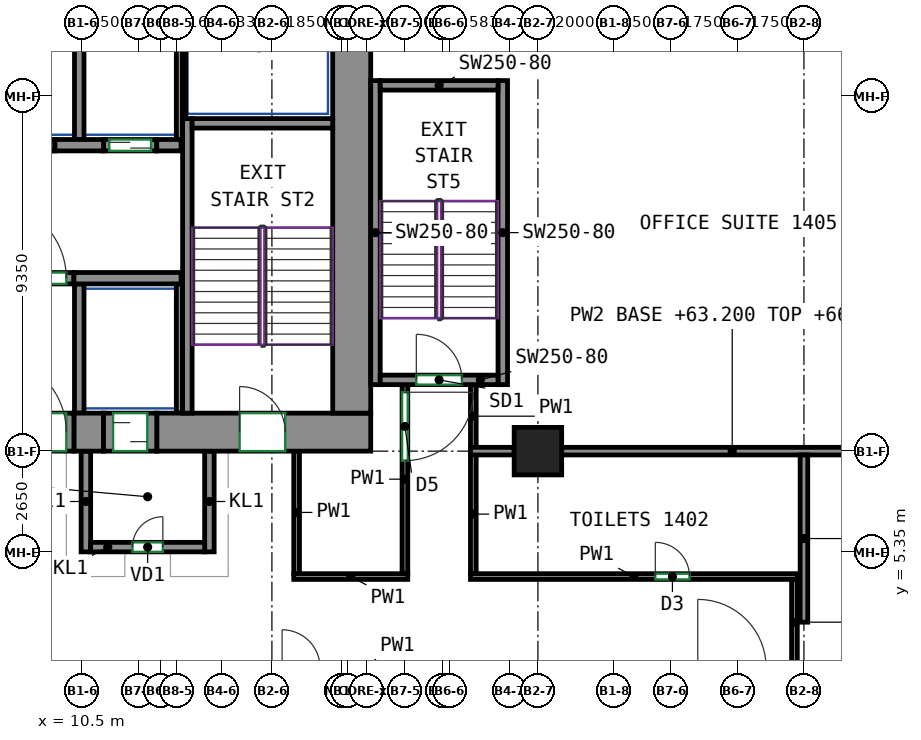
"""IFC4 building model, lengths in metres.
Left out: names, types, materials, properties, quantities, classifications, styles, units other than length and angle.
Written with IfcOpenShell. Run it as: python <this file> out.ifc"""

import sys

from ifc_helpers import new_model, si_unit, direction, frame, frame_2d, origin, origin_2d, place, context, subcontext, project, spatial, rectangle, extrude, source, transform, mapped, element, fill, save


model = new_model("IFC4")
c1 = context("Model", 3, precision=1e-05, world=origin(), true_north=direction((0.0, 1.0)))
c2 = subcontext(c1, "Body", "Model", "MODEL_VIEW")
j1 = project(units=[si_unit("LENGTHUNIT", "METRE"), si_unit("PLANEANGLEUNIT", "RADIAN")], contexts=[c1])
p1 = place(None, origin())
s1 = spatial("IfcSite", under=j1, at=p1, CompositionType="ELEMENT")
p2 = place(p1, origin())
s2 = spatial("IfcBuilding", under=s1, at=p2, CompositionType="ELEMENT")
p3 = place(p2, frame((0.0, 0.0, 63.2)))
s3 = spatial("IfcBuildingStorey", under=s2, at=p3, CompositionType="ELEMENT", Elevation=63.2)
m1 = source(origin(), c2, "Body", "SweptSolid", [
    extrude(rectangle(XDim=1.25, YDim=1.25, at=origin_2d()), origin(), (0.0, 0.0, 1.0), 3.72),
])
p4 = place(p3, frame((22.5, 8.0, 0.0), z_axis=(0.0, 0.0, 1.0), x_axis=(1.0, 0.0, 0.0)))
e1 = element("IfcColumn", 1, at=p4, inside=s3, PredefinedType="COLUMN", context=c2, shape_type="MappedRepresentation", body=[
    mapped(m1, transform((0.0, 0.0, 0.0))),
])
m2 = source(origin(), c2, "Body", "SweptSolid", [
    extrude(rectangle(XDim=0.78, YDim=1.0, at=frame_2d((0.39, 0.0))), origin(), (0.0, 0.0, 1.0), 3.72),
])
p5 = place(p3, frame((10.29, 8.5, 0.0), z_axis=(0.0, 0.0, 1.0), x_axis=(1.0, 0.0, 0.0)))
e2 = element("IfcWall", 2, at=p5, inside=s3, PredefinedType="SHEAR", context=c2, shape_type="MappedRepresentation", body=[
    mapped(m2, transform((0.0, 0.0, 0.0))),
])
m3 = source(origin(), c2, "Body", "SweptSolid", [
    extrude(rectangle(XDim=5.63, YDim=1.0, at=frame_2d((2.815, 0.0))), origin(), (0.0, 0.0, 1.0), 3.72),
])
p6 = place(p3, frame((12.47, 8.5, 0.0), z_axis=(0.0, 0.0, 1.0), x_axis=(1.0, 0.0, 0.0)))
e3 = element("IfcWall", 3, at=p6, inside=s3, PredefinedType="SHEAR", context=c2, shape_type="MappedRepresentation", body=[
    mapped(m3, transform((0.0, 0.0, 0.0))),
])
p7 = place(p6, frame((2.18, 0.0, 0.0)))
e4 = element("IfcOpeningElement", 4, at=p7, cuts=e3, PredefinedType="OPENING", context=c2, shape_type="SweptSolid", body=[
    extrude(rectangle(XDim=1.2, YDim=2.1, at=frame_2d((0.6, 1.05))), frame((0.0, 0.51, 0.0), z_axis=(0.0, -1.0, 0.0), x_axis=(1.0, 0.0, 0.0)), (0.0, 0.0, 1.0), 1.02),
])
m4 = source(origin(), c2, "Body", "SweptSolid", [
    extrude(rectangle(XDim=12.0, YDim=1.0, at=frame_2d((6.0, 0.0))), origin(), (0.0, 0.0, 1.0), 3.72),
])
p8 = place(p3, frame((17.6, 9.0, 0.0), z_axis=(0.0, 0.0, 1.0), x_axis=(0.0, 1.0, 0.0)))
e5 = element("IfcWall", 5, at=p8, inside=s3, PredefinedType="SHEAR", context=c2, shape_type="MappedRepresentation", body=[
    mapped(m4, transform((0.0, 0.0, 0.0))),
])
m5 = source(origin(), c2, "Body", "SweptSolid", [
    extrude(rectangle(XDim=7.75, YDim=0.25, at=frame_2d((3.875, 0.0))), origin(), (0.0, 0.0, 1.0), 3.72),
])
p9 = place(p3, frame((13.275, 9.0, 0.0), z_axis=(0.0, 0.0, 1.0), x_axis=(0.0, 1.0, 0.0)))
e6 = element("IfcWall", 6, at=p9, inside=s3, PredefinedType="SHEAR", context=c2, shape_type="MappedRepresentation", body=[
    mapped(m5, transform((0.0, 0.0, 0.0))),
])
m6 = source(origin(), c2, "Body", "SweptSolid", [
    extrude(rectangle(XDim=3.7, YDim=0.25, at=frame_2d((1.85, 0.0))), origin(), (0.0, 0.0, 1.0), 3.72),
])
p10 = place(p3, frame((13.4, 16.625, 0.0), z_axis=(0.0, 0.0, 1.0), x_axis=(1.0, 0.0, 0.0)))
e7 = element("IfcWall", 7, at=p10, inside=s3, PredefinedType="SHEAR", context=c2, shape_type="MappedRepresentation", body=[
    mapped(m6, transform((0.0, 0.0, 0.0))),
])
m7 = source(origin(), c2, "Body", "SweptSolid", [
    extrude(rectangle(XDim=8.0, YDim=0.25, at=frame_2d((4.0, 0.0))), origin(), (0.0, 0.0, 1.0), 3.72),
])
for number, where, z_axis, x_axis in (
    (8, (18.225, 9.75, 0.0), (0.0, 0.0, 1.0), (0.0, 1.0, 0.0)),
    (9, (21.575, 9.75, 0.0), (0.0, 0.0, 1.0), (0.0, 1.0, 0.0)),
):
    element("IfcWall", number, at=place(p3, frame(where, z_axis=z_axis, x_axis=x_axis)), inside=s3, PredefinedType="SHEAR", context=c2, shape_type="MappedRepresentation", body=[
        mapped(m7, transform((0.0, 0.0, 0.0))),
    ])
m8 = source(origin(), c2, "Body", "SweptSolid", [
    extrude(rectangle(XDim=3.1, YDim=0.25, at=frame_2d((1.55, 0.0))), origin(), (0.0, 0.0, 1.0), 3.72),
])
p11 = place(p3, frame((18.35, 9.875, 0.0), z_axis=(0.0, 0.0, 1.0), x_axis=(1.0, 0.0, 0.0)))
e10 = element("IfcWall", 10, at=p11, inside=s3, PredefinedType="SHEAR", context=c2, shape_type="MappedRepresentation", body=[
    mapped(m8, transform((0.0, 0.0, 0.0))),
])
p12 = place(p11, frame((0.95, 0.0, 0.0)))
e11 = element("IfcOpeningElement", 11, at=p12, cuts=e10, PredefinedType="OPENING", context=c2, shape_type="SweptSolid", body=[
    extrude(rectangle(XDim=1.2, YDim=2.1, at=frame_2d((0.6, 1.05))), frame((0.0, 0.135, 0.0), z_axis=(0.0, -1.0, 0.0), x_axis=(1.0, 0.0, 0.0)), (0.0, 0.0, 1.0), 0.27),
])
p13 = place(p3, frame((18.35, 17.625, 0.0), z_axis=(0.0, 0.0, 1.0), x_axis=(1.0, 0.0, 0.0)))
e12 = element("IfcWall", 12, at=p13, inside=s3, PredefinedType="SHEAR", context=c2, shape_type="MappedRepresentation", body=[
    mapped(m8, transform((0.0, 0.0, 0.0))),
])
m9 = source(origin(), c2, "Body", "SweptSolid", [
    extrude(rectangle(XDim=2.82, YDim=0.3, at=frame_2d((1.41, 0.0))), origin(), (0.0, 0.0, 1.0), 3.72),
])
p14 = place(p3, frame((10.29, 12.55, 0.0), z_axis=(0.0, 0.0, 1.0), x_axis=(1.0, 0.0, 0.0)))
e13 = element("IfcWall", 13, at=p14, inside=s3, PredefinedType="SHEAR", context=c2, shape_type="MappedRepresentation", body=[
    mapped(m9, transform((0.0, 0.0, 0.0))),
])
m10 = source(origin(), c2, "Body", "SweptSolid", [
    extrude(rectangle(XDim=1.28, YDim=0.3, at=frame_2d((0.64, 0.0))), origin(), (0.0, 0.0, 1.0), 3.72),
])
p15 = place(p3, frame((9.79, 16.05, 0.0), z_axis=(0.0, 0.0, 1.0), x_axis=(1.0, 0.0, 0.0)))
e14 = element("IfcWall", 14, at=p15, inside=s3, PredefinedType="SHEAR", context=c2, shape_type="MappedRepresentation", body=[
    mapped(m10, transform((0.0, 0.0, 0.0))),
])
m11 = source(origin(), c2, "Body", "SweptSolid", [
    extrude(rectangle(XDim=0.64, YDim=0.3, at=frame_2d((0.32, 0.0))), origin(), (0.0, 0.0, 1.0), 3.72),
])
p16 = place(p3, frame((12.47, 16.05, 0.0), z_axis=(0.0, 0.0, 1.0), x_axis=(1.0, 0.0, 0.0)))
e15 = element("IfcWall", 15, at=p16, inside=s3, PredefinedType="SHEAR", context=c2, shape_type="MappedRepresentation", body=[
    mapped(m11, transform((0.0, 0.0, 0.0))),
])
m12 = source(origin(), c2, "Body", "SweptSolid", [
    extrude(rectangle(XDim=1.4, YDim=0.3, at=frame_2d((0.7, 0.0))), origin(), (0.0, 0.0, 1.0), 3.72),
])
p17 = place(p3, frame((11.07, 16.05, 0.0), z_axis=(0.0, 0.0, 1.0), x_axis=(1.0, 0.0, 0.0)))
e16 = element("IfcWall", 16, at=p17, inside=s3, PredefinedType="PARTITIONING", context=c2, shape_type="MappedRepresentation", body=[
    mapped(m12, transform((0.0, 0.0, 0.0))),
])
p18 = place(p17, frame((0.15, 0.0, 0.0)))
e17 = element("IfcOpeningElement", 17, at=p18, cuts=e16, PredefinedType="OPENING", context=c2, shape_type="SweptSolid", body=[
    extrude(rectangle(XDim=1.1, YDim=2.1, at=frame_2d((0.55, 1.05))), frame((0.0, 0.16, 0.0), z_axis=(0.0, -1.0, 0.0), x_axis=(1.0, 0.0, 0.0)), (0.0, 0.0, 1.0), 0.32),
])
m13 = source(origin(), c2, "Body", "SweptSolid", [
    extrude(rectangle(XDim=2.4, YDim=0.3, at=frame_2d((1.2, 0.0))), origin(), (0.0, 0.0, 1.0), 3.72),
])
p19 = place(p3, frame((7.89, 12.55, 0.0), z_axis=(0.0, 0.0, 1.0), x_axis=(1.0, 0.0, 0.0)))
e18 = element("IfcWall", 18, at=p19, inside=s3, PredefinedType="PARTITIONING", context=c2, shape_type="MappedRepresentation", body=[
    mapped(m13, transform((0.0, 0.0, 0.0))),
])
p20 = place(p19, frame((0.2, 0.0, 0.0)))
e19 = element("IfcOpeningElement", 19, at=p20, cuts=e18, PredefinedType="OPENING", context=c2, shape_type="SweptSolid", body=[
    extrude(rectangle(XDim=2.0, YDim=2.1, at=frame_2d((1.0, 1.05))), frame((0.0, 0.16, 0.0), z_axis=(0.0, -1.0, 0.0), x_axis=(1.0, 0.0, 0.0)), (0.0, 0.0, 1.0), 0.32),
])
m14 = source(origin(), c2, "Body", "SweptSolid", [
    extrude(rectangle(XDim=1.4, YDim=0.3, at=frame_2d((0.7, 0.0))), origin(), (0.0, 0.0, 1.0), 3.72),
])
p21 = place(p3, frame((8.39, 16.05, 0.0), z_axis=(0.0, 0.0, 1.0), x_axis=(1.0, 0.0, 0.0)))
e20 = element("IfcWall", 20, at=p21, inside=s3, PredefinedType="PARTITIONING", context=c2, shape_type="MappedRepresentation", body=[
    mapped(m14, transform((0.0, 0.0, 0.0))),
])
m15 = source(origin(), c2, "Body", "SweptSolid", [
    extrude(rectangle(XDim=2.65, YDim=0.25, at=frame_2d((1.325, 0.0))), origin(), (0.0, 0.0, 1.0), 3.72),
])
for number, where, z_axis, x_axis in (
    (21, (10.605, 5.35, 0.0), (0.0, 0.0, 1.0), (0.0, 1.0, 0.0)),
    (22, (13.855, 5.35, 0.0), (0.0, 0.0, 1.0), (0.0, 1.0, 0.0)),
):
    element("IfcWall", number, at=place(p3, frame(where, z_axis=z_axis, x_axis=x_axis)), inside=s3, PredefinedType="PARTITIONING", context=c2, shape_type="MappedRepresentation", body=[
        mapped(m15, transform((0.0, 0.0, 0.0))),
    ])
m16 = source(origin(), c2, "Body", "SweptSolid", [
    extrude(rectangle(XDim=3.0, YDim=0.25, at=frame_2d((1.5, 0.0))), origin(), (0.0, 0.0, 1.0), 3.72),
])
p22 = place(p3, frame((10.73, 5.475, 0.0), z_axis=(0.0, 0.0, 1.0), x_axis=(1.0, 0.0, 0.0)))
e23 = element("IfcWall", 23, at=p22, inside=s3, PredefinedType="PARTITIONING", context=c2, shape_type="MappedRepresentation", body=[
    mapped(m16, transform((0.0, 0.0, 0.0))),
])
p23 = place(p22, frame((1.1, 0.0, 0.0)))
e24 = element("IfcOpeningElement", 24, at=p23, cuts=e23, PredefinedType="OPENING", context=c2, shape_type="SweptSolid", body=[
    extrude(rectangle(XDim=0.8, YDim=2.0, at=frame_2d((0.4, 1.0))), frame((0.0, 0.135, 0.0), z_axis=(0.0, -1.0, 0.0), x_axis=(1.0, 0.0, 0.0)), (0.0, 0.0, 1.0), 0.27),
])
m17 = source(origin(), c2, "Body", "SweptSolid", [
    extrude(rectangle(XDim=3.275, YDim=0.165, at=frame_2d((1.638, 0.0))), origin(), (0.0, 0.0, 1.0), 3.72),
])
p24 = place(p3, frame((13.067, 16.2, 0.0), z_axis=(0.0, 0.0, 1.0), x_axis=(0.0, 1.0, 0.0)))
e25 = element("IfcWall", 25, at=p24, inside=s3, PredefinedType="PARTITIONING", context=c2, shape_type="MappedRepresentation", body=[
    mapped(m17, transform((0.0, 0.0, 0.0))),
])
m18 = source(origin(), c2, "Body", "SweptSolid", [
    extrude(rectangle(XDim=3.275, YDim=0.25, at=frame_2d((1.638, 0.0))), origin(), (0.0, 0.0, 1.0), 3.72),
])
p25 = place(p3, frame((10.43, 16.2, 0.0), z_axis=(0.0, 0.0, 1.0), x_axis=(0.0, 1.0, 0.0)))
e26 = element("IfcWall", 26, at=p25, inside=s3, PredefinedType="PARTITIONING", context=c2, shape_type="MappedRepresentation", body=[
    mapped(m18, transform((0.0, 0.0, 0.0))),
])
m19 = source(origin(), c2, "Body", "SweptSolid", [
    extrude(rectangle(XDim=2.725, YDim=0.085, at=frame_2d((1.363, 0.0))), origin(), (0.0, 0.0, 1.0), 3.72),
])
p26 = place(p3, frame((13.192, 16.75, 0.0), z_axis=(0.0, 0.0, 1.0), x_axis=(0.0, 1.0, 0.0)))
e27 = element("IfcWall", 27, at=p26, inside=s3, PredefinedType="PARTITIONING", context=c2, shape_type="MappedRepresentation", body=[
    mapped(m19, transform((0.0, 0.0, 0.0))),
])
m20 = source(origin(), c2, "Body", "SweptSolid", [
    extrude(rectangle(XDim=3.4, YDim=0.25, at=frame_2d((1.7, 0.0))), origin(), (0.0, 0.0, 1.0), 3.72),
])
p27 = place(p3, frame((10.43, 9.0, 0.0), z_axis=(0.0, 0.0, 1.0), x_axis=(0.0, 1.0, 0.0)))
e28 = element("IfcWall", 28, at=p27, inside=s3, PredefinedType="PARTITIONING", context=c2, shape_type="MappedRepresentation", body=[
    mapped(m20, transform((0.0, 0.0, 0.0))),
])
m21 = source(origin(), c2, "Body", "SweptSolid", [
    extrude(rectangle(XDim=3.4, YDim=0.165, at=frame_2d((1.7, 0.0))), origin(), (0.0, 0.0, 1.0), 3.72),
])
p28 = place(p3, frame((13.067, 9.0, 0.0), z_axis=(0.0, 0.0, 1.0), x_axis=(0.0, 1.0, 0.0)))
e29 = element("IfcWall", 29, at=p28, inside=s3, PredefinedType="PARTITIONING", context=c2, shape_type="MappedRepresentation", body=[
    mapped(m21, transform((0.0, 0.0, 0.0))),
])
m22 = source(origin(), c2, "Body", "SweptSolid", [
    extrude(rectangle(XDim=2.4, YDim=1.0, at=frame_2d((1.2, 0.0))), origin(), (0.0, 0.0, 1.0), 2.7),
])
p29 = place(p3, frame((7.89, 8.5, 0.0), z_axis=(0.0, 0.0, 1.0), x_axis=(1.0, 0.0, 0.0)))
e30 = element("IfcWall", 30, at=p29, inside=s3, PredefinedType="PARTITIONING", context=c2, shape_type="MappedRepresentation", body=[
    mapped(m22, transform((0.0, 0.0, 0.0))),
])
p30 = place(p29, frame((0.2, 0.0, 0.0)))
e31 = element("IfcOpeningElement", 31, at=p30, cuts=e30, PredefinedType="OPENING", context=c2, shape_type="SweptSolid", body=[
    extrude(rectangle(XDim=2.0, YDim=2.1, at=frame_2d((1.0, 1.05))), frame((0.0, 0.51, 0.0), z_axis=(0.0, -1.0, 0.0), x_axis=(1.0, 0.0, 0.0)), (0.0, 0.0, 1.0), 1.02),
])
m23 = source(origin(), c2, "Body", "SweptSolid", [
    extrude(rectangle(XDim=1.4, YDim=1.0, at=frame_2d((0.7, 0.0))), origin(), (0.0, 0.0, 1.0), 2.7),
])
p31 = place(p3, frame((11.07, 8.5, 0.0), z_axis=(0.0, 0.0, 1.0), x_axis=(1.0, 0.0, 0.0)))
e32 = element("IfcWall", 32, at=p31, inside=s3, PredefinedType="PARTITIONING", context=c2, shape_type="MappedRepresentation", body=[
    mapped(m23, transform((0.0, 0.0, 0.0))),
])
p32 = place(p31, frame((0.25, 0.0, 0.0)))
e33 = element("IfcOpeningElement", 33, at=p32, cuts=e32, PredefinedType="OPENING", context=c2, shape_type="SweptSolid", body=[
    extrude(rectangle(XDim=0.9, YDim=2.1, at=frame_2d((0.45, 1.05))), frame((0.0, 0.51, 0.0), z_axis=(0.0, -1.0, 0.0), x_axis=(1.0, 0.0, 0.0)), (0.0, 0.0, 1.0), 1.02),
])
p33 = place(p3, frame((16.15, 4.775, 0.0), z_axis=(0.0, 0.0, 1.0), x_axis=(0.0, 1.0, 0.0)))
e34 = element("IfcWall", 34, at=p33, inside=s3, PredefinedType="PARTITIONING", context=c2, shape_type="SweptSolid", body=[
    extrude(rectangle(XDim=3.225, YDim=0.15, at=frame_2d((1.613, 0.0))), origin(), (0.0, 0.0, 1.0), 3.72),
])
p34 = place(p3, frame((16.075, 4.7, 0.0), z_axis=(0.0, 0.0, 1.0), x_axis=(1.0, 0.0, 0.0)))
e35 = element("IfcWall", 35, at=p34, inside=s3, PredefinedType="PARTITIONING", context=c2, shape_type="SweptSolid", body=[
    extrude(rectangle(XDim=3.0, YDim=0.15, at=frame_2d((1.5, 0.0))), origin(), (0.0, 0.0, 1.0), 3.72),
])
p35 = place(p3, frame((19.0, 9.75, 0.0), z_axis=(0.0, 0.0, 1.0), x_axis=(0.0, -1.0, 0.0)))
e36 = element("IfcWall", 36, at=p35, inside=s3, PredefinedType="PARTITIONING", context=c2, shape_type="SweptSolid", body=[
    extrude(rectangle(XDim=4.975, YDim=0.15, at=frame_2d((2.488, 0.0))), origin(), (0.0, 0.0, 1.0), 3.72),
])
p36 = place(p35, frame((0.2, 0.0, 0.0)))
e37 = element("IfcOpeningElement", 37, at=p36, cuts=e36, PredefinedType="OPENING", context=c2, shape_type="SweptSolid", body=[
    extrude(rectangle(XDim=1.8, YDim=2.1, at=frame_2d((0.9, 1.05))), frame((0.0, 0.085, 0.0), z_axis=(0.0, -1.0, 0.0), x_axis=(1.0, 0.0, 0.0)), (0.0, 0.0, 1.0), 0.17),
])
p37 = place(p3, frame((20.8, 8.09, 0.0), z_axis=(0.0, 0.0, 1.0), x_axis=(0.0, 1.0, 0.0)))
e38 = element("IfcWall", 38, at=p37, inside=s3, PredefinedType="PARTITIONING", context=c2, shape_type="SweptSolid", body=[
    extrude(rectangle(XDim=1.66, YDim=0.15, at=frame_2d((0.83, 0.0))), origin(), (0.0, 0.0, 1.0), 3.72),
])
p38 = place(p3, frame((20.8, 4.775, 0.0), z_axis=(0.0, 0.0, 1.0), x_axis=(0.0, 1.0, 0.0)))
e39 = element("IfcWall", 39, at=p38, inside=s3, PredefinedType="PARTITIONING", context=c2, shape_type="SweptSolid", body=[
    extrude(rectangle(XDim=3.135, YDim=0.15, at=frame_2d((1.567, 0.0))), origin(), (0.0, 0.0, 1.0), 3.72),
])
p39 = place(p3, frame((20.725, 4.7, 0.0), z_axis=(0.0, 0.0, 1.0), x_axis=(1.0, 0.0, 0.0)))
e40 = element("IfcWall", 40, at=p39, inside=s3, PredefinedType="PARTITIONING", context=c2, shape_type="SweptSolid", body=[
    extrude(rectangle(XDim=8.6, YDim=0.15, at=frame_2d((4.3, 0.0))), origin(), (0.0, 0.0, 1.0), 3.72),
])
p40 = place(p39, frame((4.864, 0.0, 0.0)))
e41 = element("IfcOpeningElement", 41, at=p40, cuts=e40, PredefinedType="OPENING", context=c2, shape_type="SweptSolid", body=[
    extrude(rectangle(XDim=0.9, YDim=2.1, at=frame_2d((0.45, 1.05))), frame((0.0, 0.085, 0.0), z_axis=(0.0, -1.0, 0.0), x_axis=(1.0, 0.0, 0.0)), (0.0, 0.0, 1.0), 0.17),
])
p41 = place(p3, frame((29.25, 2.375, 0.0), z_axis=(0.0, 0.0, 1.0), x_axis=(0.0, 1.0, 0.0)))
e42 = element("IfcWall", 42, at=p41, inside=s3, PredefinedType="PARTITIONING", context=c2, shape_type="SweptSolid", body=[
    extrude(rectangle(XDim=2.25, YDim=0.15, at=frame_2d((1.125, 0.0))), origin(), (0.0, 0.0, 1.0), 3.07),
])
p42 = place(p3, frame((23.125, 8.0, 0.0), z_axis=(0.0, 0.0, 1.0), x_axis=(1.0, 0.0, 0.0)))
e43 = element("IfcWall", 43, at=p42, inside=s3, PredefinedType="PARTITIONING", context=c2, shape_type="SweptSolid", body=[
    extrude(rectangle(XDim=8.975, YDim=0.2, at=frame_2d((4.488, 0.0))), origin(), (0.0, 0.0, 1.0), 3.07),
])
p43 = place(p3, frame((20.726, 8.0, 0.0), z_axis=(0.0, 0.0, 1.0), x_axis=(1.0, 0.0, 0.0)))
e44 = element("IfcWall", 44, at=p43, inside=s3, PredefinedType="PARTITIONING", context=c2, shape_type="SweptSolid", body=[
    extrude(rectangle(XDim=1.149, YDim=0.2, at=frame_2d((0.574, 0.0))), origin(), (0.0, 0.0, 1.0), 3.72),
])
p44 = place(p3, frame((29.5, 3.5, 0.0), z_axis=(0.0, 0.0, 1.0), x_axis=(0.0, 1.0, 0.0)))
e45 = element("IfcWall", 45, at=p44, inside=s3, PredefinedType="PARTITIONING", context=c2, shape_type="SweptSolid", body=[
    extrude(rectangle(XDim=4.4, YDim=0.2, at=frame_2d((2.2, 0.0))), origin(), (0.0, 0.0, 1.0), 3.07),
])
p45 = place(p20, origin())
e46 = element("IfcDoor", 46, at=p45, inside=s3, OperationType="DOUBLE_DOOR_SINGLE_SWING", PredefinedType="DOOR", context=c2, shape_type="SweptSolid", body=[
    extrude(rectangle(XDim=2.0, YDim=2.1, at=frame_2d((1.0, 1.05))), frame((0.0, 0.025, 0.0), z_axis=(0.0, -1.0, 0.0), x_axis=(1.0, 0.0, 0.0)), (0.0, 0.0, 1.0), 0.05),
])
fill(e19, e46)
p46 = place(p30, origin())
e47 = element("IfcDoor", 47, at=p46, inside=s3, OperationType="DOUBLE_DOOR_SINGLE_SWING", PredefinedType="DOOR", context=c2, shape_type="SweptSolid", body=[
    extrude(rectangle(XDim=2.0, YDim=2.1, at=frame_2d((1.0, 1.05))), frame((0.0, 0.405, 0.0), z_axis=(0.0, -1.0, 0.0), x_axis=(1.0, 0.0, 0.0)), (0.0, 0.0, 1.0), 0.05),
])
fill(e31, e47)
p47 = place(p23, origin())
e48 = element("IfcDoor", 48, at=p47, inside=s3, OperationType="SINGLE_SWING_RIGHT", PredefinedType="DOOR", context=c2, shape_type="SweptSolid", body=[
    extrude(rectangle(XDim=0.8, YDim=2.0, at=frame_2d((0.4, 1.0))), frame((0.0, 0.025, 0.0), z_axis=(0.0, -1.0, 0.0), x_axis=(1.0, 0.0, 0.0)), (0.0, 0.0, 1.0), 0.05),
])
fill(e24, e48)
p48 = place(p32, origin())
e49 = element("IfcDoor", 49, at=p48, inside=s3, OperationType="SLIDING_TO_LEFT", PredefinedType="DOOR", context=c2, shape_type="SweptSolid", body=[
    extrude(rectangle(XDim=0.9, YDim=2.1, at=frame_2d((0.45, 1.05))), frame((0.0, 0.405, 0.0), z_axis=(0.0, -1.0, 0.0), x_axis=(1.0, 0.0, 0.0)), (0.0, 0.0, 1.0), 0.05),
])
fill(e33, e49)
p49 = place(p18, origin())
e50 = element("IfcDoor", 50, at=p49, inside=s3, OperationType="DOUBLE_DOOR_SLIDING", PredefinedType="DOOR", context=c2, shape_type="SweptSolid", body=[
    extrude(rectangle(XDim=1.1, YDim=2.1, at=frame_2d((0.55, 1.05))), frame((0.0, 0.025, 0.0), z_axis=(0.0, -1.0, 0.0), x_axis=(1.0, 0.0, 0.0)), (0.0, 0.0, 1.0), 0.05),
])
fill(e17, e50)
p50 = place(p7, origin())
e51 = element("IfcDoor", 51, at=p50, inside=s3, OperationType="DOUBLE_DOOR_SINGLE_SWING", PredefinedType="DOOR", context=c2, shape_type="SweptSolid", body=[
    extrude(rectangle(XDim=1.2, YDim=2.1, at=frame_2d((0.6, 1.05))), frame((0.0, 0.405, 0.0), z_axis=(0.0, -1.0, 0.0), x_axis=(1.0, 0.0, 0.0)), (0.0, 0.0, 1.0), 0.05),
])
fill(e4, e51)
p51 = place(p12, origin())
e52 = element("IfcDoor", 52, at=p51, inside=s3, OperationType="DOUBLE_DOOR_SINGLE_SWING", PredefinedType="DOOR", context=c2, shape_type="SweptSolid", body=[
    extrude(rectangle(XDim=1.2, YDim=2.1, at=frame_2d((0.6, 1.05))), frame((0.0, 0.025, 0.0), z_axis=(0.0, -1.0, 0.0), x_axis=(1.0, 0.0, 0.0)), (0.0, 0.0, 1.0), 0.05),
])
fill(e11, e52)
p52 = place(p40, origin())
e53 = element("IfcDoor", 53, at=p52, inside=s3, OperationType="SINGLE_SWING_LEFT", PredefinedType="DOOR", context=c2, shape_type="SweptSolid", body=[
    extrude(rectangle(XDim=0.9, YDim=2.1, at=frame_2d((0.45, 1.05))), frame((0.0, 0.025, 0.0), z_axis=(0.0, -1.0, 0.0), x_axis=(1.0, 0.0, 0.0)), (0.0, 0.0, 1.0), 0.05),
])
fill(e41, e53)
p53 = place(p36, origin())
e54 = element("IfcDoor", 54, at=p53, inside=s3, OperationType="DOUBLE_DOOR_SINGLE_SWING", PredefinedType="DOOR", context=c2, shape_type="SweptSolid", body=[
    extrude(rectangle(XDim=1.8, YDim=2.1, at=frame_2d((0.9, 1.05))), frame((0.0, 0.025, 0.0), z_axis=(0.0, -1.0, 0.0), x_axis=(1.0, 0.0, 0.0)), (0.0, 0.0, 1.0), 0.05),
])
fill(e37, e54)
save(model, sys.argv[1])
